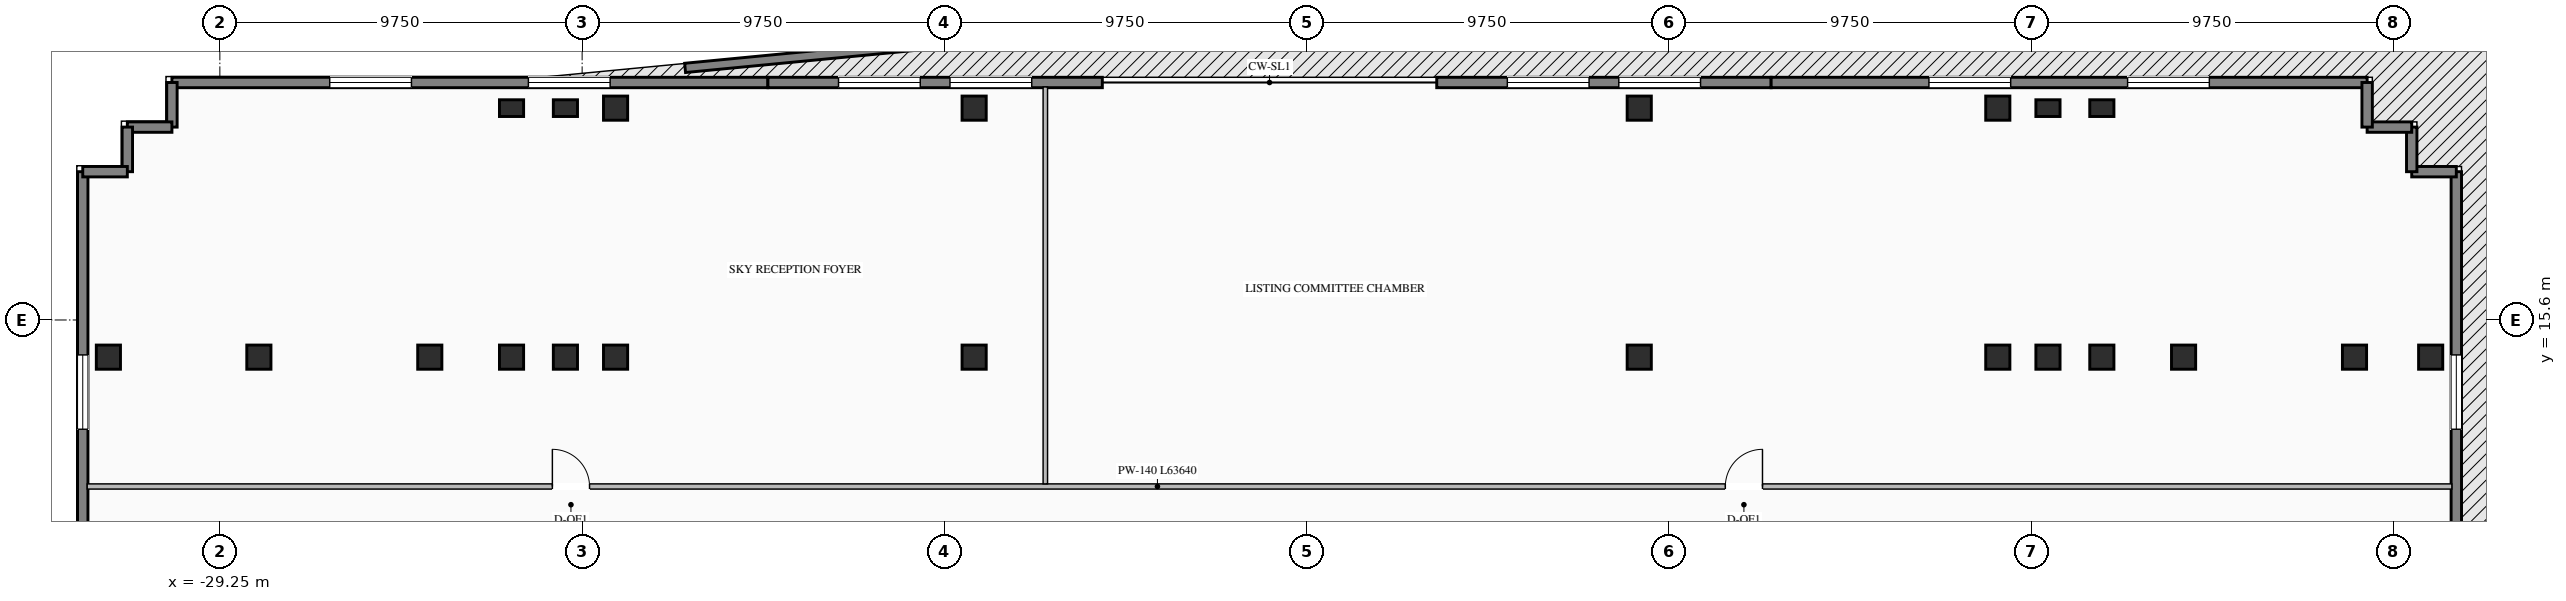
"""IFC4 building model, lengths in metres.
Left out: names, types, materials, properties, quantities, classifications, styles, units other than length and angle.
Written with IfcOpenShell. Run it as: python <this file> out.ifc"""

import sys

from ifc_helpers import new_model, si_unit, direction, frame, frame_2d, origin, origin_2d, place, context, subcontext, project, spatial, rectangle, i_section, extrude, element, fill, save


model = new_model("IFC4")
c1 = context("Model", 3, precision=1e-05, world=origin(), true_north=direction((0.0, 1.0)))
c2 = subcontext(c1, "Body", "Model", "MODEL_VIEW")
j1 = project(units=[si_unit("LENGTHUNIT", "METRE"), si_unit("PLANEANGLEUNIT", "RADIAN")], contexts=[c1])
p1 = place(None, origin())
s1 = spatial("IfcSite", under=j1, at=p1, CompositionType="ELEMENT")
p2 = place(p1, origin())
s2 = spatial("IfcBuilding", under=s1, at=p2, CompositionType="ELEMENT")
p3 = place(p2, frame((0.0, 0.0, 116.65)))
s3 = spatial("IfcBuildingStorey", under=s2, at=p3, CompositionType="ELEMENT", Elevation=116.65)
for number, where, z_axis, x_axis in (
    (1, (-21.4, 14.6, 0.0), (0.0, 0.0, 1.0), (1.0, 0.0, 0.0)),
    (2, (-19.95, 14.6, 0.0), (0.0, 0.0, 1.0), (1.0, 0.0, 0.0)),
    (3, (-18.6, 14.6, 0.0), (0.0, 0.0, 1.0), (1.0, 0.0, 0.0)),
    (4, (-8.95, 14.6, 0.0), (0.0, 0.0, 1.0), (1.0, 0.0, 0.0)),
    (5, (8.95, 14.6, 0.0), (0.0, 0.0, 1.0), (1.0, 0.0, 0.0)),
    (6, (18.6, 14.6, 0.0), (0.0, 0.0, 1.0), (1.0, 0.0, 0.0)),
    (7, (19.95, 14.6, 0.0), (0.0, 0.0, 1.0), (1.0, 0.0, 0.0)),
    (8, (21.4, 14.6, 0.0), (0.0, 0.0, 1.0), (1.0, 0.0, 0.0)),
    (9, (-23.6, 14.6, 0.0), (0.0, 0.0, 1.0), (1.0, 0.0, 0.0)),
    (10, (23.6, 14.6, 0.0), (0.0, 0.0, 1.0), (1.0, 0.0, 0.0)),
    (11, (-28.2, 14.6, 0.0), (0.0, 0.0, 1.0), (1.0, 0.0, 0.0)),
    (12, (28.2, 14.6, 0.0), (0.0, 0.0, 1.0), (1.0, 0.0, 0.0)),
    (13, (-18.6, 21.3, 0.0), (0.0, 0.0, 1.0), (1.0, 0.0, 0.0)),
    (14, (-8.95, 21.3, 0.0), (0.0, 0.0, 1.0), (1.0, 0.0, 0.0)),
):
    element("IfcColumn", number, at=place(p3, frame(where, z_axis=z_axis, x_axis=x_axis)), inside=s3, PredefinedType="COLUMN", context=c2, shape_type="SweptSolid", body=[
        extrude(i_section(OverallWidth=0.65, OverallDepth=0.65, WebThickness=0.028, FlangeThickness=0.04, at=origin_2d()), origin(), (0.0, 0.0, 1.0), 4.2),
    ])
for number, where, z_axis, x_axis in (
    (15, (8.95, 21.3, -0.28), (0.0, 0.0, 1.0), (1.0, 0.0, 0.0)),
    (16, (18.6, 21.3, -0.28), (0.0, 0.0, 1.0), (1.0, 0.0, 0.0)),
    (17, (-32.25, 14.6, -0.28), (0.0, 0.0, 1.0), (1.0, 0.0, 0.0)),
    (18, (30.25, 14.6, -0.28), (0.0, 0.0, 1.0), (1.0, 0.0, 0.0)),
):
    element("IfcColumn", number, at=place(p3, frame(where, z_axis=z_axis, x_axis=x_axis)), inside=s3, PredefinedType="COLUMN", context=c2, shape_type="SweptSolid", body=[
        extrude(i_section(OverallWidth=0.65, OverallDepth=0.65, WebThickness=0.028, FlangeThickness=0.04, at=origin_2d()), origin(), (0.0, 0.0, 1.0), 4.48),
    ])
for number, where, z_axis, x_axis in (
    (19, (-21.4, 21.3, 0.0), (0.0, 0.0, 1.0), (1.0, 0.0, 0.0)),
    (20, (-19.95, 21.3, 0.0), (0.0, 0.0, 1.0), (1.0, 0.0, 0.0)),
):
    element("IfcColumn", number, at=place(p3, frame(where, z_axis=z_axis, x_axis=x_axis)), inside=s3, PredefinedType="PILASTER", context=c2, shape_type="SweptSolid", body=[
        extrude(rectangle(XDim=0.65, YDim=0.45, at=origin_2d()), origin(), (0.0, 0.0, 1.0), 4.2),
    ])
for number, where, z_axis, x_axis in (
    (21, (19.95, 21.3, -0.28), (0.0, 0.0, 1.0), (1.0, 0.0, 0.0)),
    (22, (21.4, 21.3, -0.28), (0.0, 0.0, 1.0), (1.0, 0.0, 0.0)),
):
    element("IfcColumn", number, at=place(p3, frame(where, z_axis=z_axis, x_axis=x_axis)), inside=s3, PredefinedType="PILASTER", context=c2, shape_type="SweptSolid", body=[
        extrude(rectangle(XDim=0.65, YDim=0.45, at=origin_2d()), origin(), (0.0, 0.0, 1.0), 4.48),
    ])
p4 = place(p3, frame((-30.54, 21.99, 0.0), z_axis=(0.0, 0.0, 1.0), x_axis=(1.0, 0.0, 0.0)))
e23 = element("IfcWall", 23, at=p4, inside=s3, PredefinedType="STANDARD", context=c2, shape_type="SweptSolid", body=[
    extrude(rectangle(XDim=16.04, YDim=0.28, at=frame_2d((8.02, 0.0))), origin(), (0.0, 0.0, 1.0), 4.0),
])
p5 = place(p4, frame((4.247, 0.0, 0.76)))
e24 = element("IfcOpeningElement", 24, at=p5, cuts=e23, PredefinedType="OPENING", context=c2, shape_type="SweptSolid", body=[
    extrude(rectangle(XDim=2.2, YDim=2.25, at=frame_2d((1.1, 1.125))), frame((0.0, 0.15, 0.0), z_axis=(0.0, -1.0, 0.0), x_axis=(1.0, 0.0, 0.0)), (0.0, 0.0, 1.0), 0.3),
])
p6 = place(p4, frame((9.593, 0.0, 0.76)))
e25 = element("IfcOpeningElement", 25, at=p6, cuts=e23, PredefinedType="OPENING", context=c2, shape_type="SweptSolid", body=[
    extrude(rectangle(XDim=2.2, YDim=2.25, at=frame_2d((1.1, 1.125))), frame((0.0, 0.15, 0.0), z_axis=(0.0, -1.0, 0.0), x_axis=(1.0, 0.0, 0.0)), (0.0, 0.0, 1.0), 0.3),
])
p7 = place(p3, frame((-14.5, 21.99, 0.0), z_axis=(0.0, 0.0, 1.0), x_axis=(1.0, 0.0, 0.0)))
e26 = element("IfcWall", 26, at=p7, inside=s3, PredefinedType="STANDARD", context=c2, shape_type="SweptSolid", body=[
    extrude(rectangle(XDim=9.0, YDim=0.28, at=frame_2d((4.5, 0.0))), origin(), (0.0, 0.0, 1.0), 4.0),
])
p8 = place(p7, frame((1.9, 0.0, 0.76)))
e27 = element("IfcOpeningElement", 27, at=p8, cuts=e26, PredefinedType="OPENING", context=c2, shape_type="SweptSolid", body=[
    extrude(rectangle(XDim=2.2, YDim=2.25, at=frame_2d((1.1, 1.125))), frame((0.0, 0.15, 0.0), z_axis=(0.0, -1.0, 0.0), x_axis=(1.0, 0.0, 0.0)), (0.0, 0.0, 1.0), 0.3),
])
p9 = place(p7, frame((4.9, 0.0, 0.76)))
e28 = element("IfcOpeningElement", 28, at=p9, cuts=e26, PredefinedType="OPENING", context=c2, shape_type="SweptSolid", body=[
    extrude(rectangle(XDim=2.2, YDim=2.25, at=frame_2d((1.1, 1.125))), frame((0.0, 0.15, 0.0), z_axis=(0.0, -1.0, 0.0), x_axis=(1.0, 0.0, 0.0)), (0.0, 0.0, 1.0), 0.3),
])
p10 = place(p3, frame((3.5, 21.99, 0.0), z_axis=(0.0, 0.0, 1.0), x_axis=(1.0, 0.0, 0.0)))
e29 = element("IfcWall", 29, at=p10, inside=s3, PredefinedType="STANDARD", context=c2, shape_type="SweptSolid", body=[
    extrude(rectangle(XDim=9.0, YDim=0.28, at=frame_2d((4.5, 0.0))), origin(), (0.0, 0.0, 1.0), 4.0),
])
p11 = place(p10, frame((1.9, 0.0, 0.76)))
e30 = element("IfcOpeningElement", 30, at=p11, cuts=e29, PredefinedType="OPENING", context=c2, shape_type="SweptSolid", body=[
    extrude(rectangle(XDim=2.2, YDim=2.25, at=frame_2d((1.1, 1.125))), frame((0.0, 0.15, 0.0), z_axis=(0.0, -1.0, 0.0), x_axis=(1.0, 0.0, 0.0)), (0.0, 0.0, 1.0), 0.3),
])
p12 = place(p10, frame((4.9, 0.0, 0.76)))
e31 = element("IfcOpeningElement", 31, at=p12, cuts=e29, PredefinedType="OPENING", context=c2, shape_type="SweptSolid", body=[
    extrude(rectangle(XDim=2.2, YDim=2.25, at=frame_2d((1.1, 1.125))), frame((0.0, 0.15, 0.0), z_axis=(0.0, -1.0, 0.0), x_axis=(1.0, 0.0, 0.0)), (0.0, 0.0, 1.0), 0.3),
])
p13 = place(p3, frame((12.5, 21.99, 0.0), z_axis=(0.0, 0.0, 1.0), x_axis=(1.0, 0.0, 0.0)))
e32 = element("IfcWall", 32, at=p13, inside=s3, PredefinedType="STANDARD", context=c2, shape_type="SweptSolid", body=[
    extrude(rectangle(XDim=16.04, YDim=0.28, at=frame_2d((8.02, 0.0))), origin(), (0.0, 0.0, 1.0), 4.0),
])
p14 = place(p13, frame((4.247, 0.0, 0.76)))
e33 = element("IfcOpeningElement", 33, at=p14, cuts=e32, PredefinedType="OPENING", context=c2, shape_type="SweptSolid", body=[
    extrude(rectangle(XDim=2.2, YDim=2.25, at=frame_2d((1.1, 1.125))), frame((0.0, 0.15, 0.0), z_axis=(0.0, -1.0, 0.0), x_axis=(1.0, 0.0, 0.0)), (0.0, 0.0, 1.0), 0.3),
])
p15 = place(p13, frame((9.593, 0.0, 0.76)))
e34 = element("IfcOpeningElement", 34, at=p15, cuts=e32, PredefinedType="OPENING", context=c2, shape_type="SweptSolid", body=[
    extrude(rectangle(XDim=2.2, YDim=2.25, at=frame_2d((1.1, 1.125))), frame((0.0, 0.15, 0.0), z_axis=(0.0, -1.0, 0.0), x_axis=(1.0, 0.0, 0.0)), (0.0, 0.0, 1.0), 0.3),
])
p16 = place(p3, frame((-32.94, 1.8, 0.0), z_axis=(0.0, 0.0, 1.0), x_axis=(0.0, 1.0, 0.0)))
e35 = element("IfcWall", 35, at=p16, inside=s3, PredefinedType="STANDARD", context=c2, shape_type="SweptSolid", body=[
    extrude(rectangle(XDim=17.79, YDim=0.28, at=frame_2d((8.895, 0.0))), origin(), (0.0, 0.0, 1.0), 4.0),
])
p17 = place(p16, frame((4.93, 0.0, 0.76)))
e36 = element("IfcOpeningElement", 36, at=p17, cuts=e35, PredefinedType="OPENING", context=c2, shape_type="SweptSolid", body=[
    extrude(rectangle(XDim=2.0, YDim=2.05, at=frame_2d((1.0, 1.025))), frame((0.0, 0.15, 0.0), z_axis=(0.0, -1.0, 0.0), x_axis=(1.0, 0.0, 0.0)), (0.0, 0.0, 1.0), 0.3),
])
p18 = place(p16, frame((10.86, 0.0, 0.76)))
e37 = element("IfcOpeningElement", 37, at=p18, cuts=e35, PredefinedType="OPENING", context=c2, shape_type="SweptSolid", body=[
    extrude(rectangle(XDim=2.0, YDim=2.05, at=frame_2d((1.0, 1.025))), frame((0.0, 0.15, 0.0), z_axis=(0.0, -1.0, 0.0), x_axis=(1.0, 0.0, 0.0)), (0.0, 0.0, 1.0), 0.3),
])
p19 = place(p3, frame((30.94, 19.59, 0.0), z_axis=(0.0, 0.0, 1.0), x_axis=(0.0, -1.0, 0.0)))
e38 = element("IfcWall", 38, at=p19, inside=s3, PredefinedType="STANDARD", context=c2, shape_type="SweptSolid", body=[
    extrude(rectangle(XDim=17.79, YDim=0.28, at=frame_2d((8.895, 0.0))), origin(), (0.0, 0.0, 1.0), 4.0),
])
p20 = place(p19, frame((4.93, 0.0, 0.76)))
e39 = element("IfcOpeningElement", 39, at=p20, cuts=e38, PredefinedType="OPENING", context=c2, shape_type="SweptSolid", body=[
    extrude(rectangle(XDim=2.0, YDim=2.05, at=frame_2d((1.0, 1.025))), frame((0.0, 0.15, 0.0), z_axis=(0.0, -1.0, 0.0), x_axis=(1.0, 0.0, 0.0)), (0.0, 0.0, 1.0), 0.3),
])
p21 = place(p19, frame((10.86, 0.0, 0.76)))
e40 = element("IfcOpeningElement", 40, at=p21, cuts=e38, PredefinedType="OPENING", context=c2, shape_type="SweptSolid", body=[
    extrude(rectangle(XDim=2.0, YDim=2.05, at=frame_2d((1.0, 1.025))), frame((0.0, 0.15, 0.0), z_axis=(0.0, -1.0, 0.0), x_axis=(1.0, 0.0, 0.0)), (0.0, 0.0, 1.0), 0.3),
])
for number, where, z_axis, x_axis in (
    (41, (30.94, 19.59, 0.0), (0.0, 0.0, 1.0), (-1.0, 0.0, 0.0)),
    (42, (29.74, 19.59, 0.0), (0.0, 0.0, 1.0), (0.0, 1.0, 0.0)),
    (43, (29.74, 20.79, 0.0), (0.0, 0.0, 1.0), (-1.0, 0.0, 0.0)),
    (44, (28.54, 20.79, 0.0), (0.0, 0.0, 1.0), (0.0, 1.0, 0.0)),
    (45, (-30.54, 21.99, 0.0), (0.0, 0.0, 1.0), (0.0, -1.0, 0.0)),
    (46, (-30.54, 20.79, 0.0), (0.0, 0.0, 1.0), (-1.0, 0.0, 0.0)),
    (47, (-31.74, 20.79, 0.0), (0.0, 0.0, 1.0), (0.0, -1.0, 0.0)),
    (48, (-31.74, 19.59, 0.0), (0.0, 0.0, 1.0), (-1.0, 0.0, 0.0)),
):
    element("IfcWall", number, at=place(p3, frame(where, z_axis=z_axis, x_axis=x_axis)), inside=s3, PredefinedType="STANDARD", context=c2, shape_type="SweptSolid", body=[
        extrude(rectangle(XDim=1.2, YDim=0.28, at=frame_2d((0.6, 0.0))), origin(), (0.0, 0.0, 1.0), 4.0),
    ])
p22 = place(p3, frame((-16.729, 22.383, 0.0), z_axis=(0.0, 0.0, 1.0), x_axis=(0.995396386066, 0.09584380317, 0.0)))
e49 = element("IfcWall", 49, at=p22, inside=s3, PredefinedType="PARAPET", context=c2, shape_type="SweptSolid", body=[
    extrude(rectangle(XDim=50.026, YDim=0.25, at=frame_2d((25.013, 0.0))), origin(), (0.0, 0.0, 1.0), 1.2),
])
p23 = place(p3, frame((-32.82, 11.12, 0.0), z_axis=(0.0, 0.0, 1.0), x_axis=(1.0, 0.0, 0.0)))
e50 = element("IfcWall", 50, at=p23, inside=s3, PredefinedType="STANDARD", context=c2, shape_type="SweptSolid", body=[
    extrude(rectangle(XDim=63.64, YDim=0.14, at=frame_2d((31.82, 0.0))), origin(), (0.0, 0.0, 1.0), 4.0),
])
p24 = place(p23, frame((12.519, 0.0, 0.0)))
e51 = element("IfcOpeningElement", 51, at=p24, cuts=e50, PredefinedType="OPENING", context=c2, shape_type="SweptSolid", body=[
    extrude(rectangle(XDim=1.0, YDim=2.08, at=frame_2d((0.5, 1.04))), frame((0.0, 0.08, 0.0), z_axis=(0.0, -1.0, 0.0), x_axis=(1.0, 0.0, 0.0)), (0.0, 0.0, 1.0), 0.16),
])
p25 = place(p23, frame((44.087, 0.0, 0.0)))
e52 = element("IfcOpeningElement", 52, at=p25, cuts=e50, PredefinedType="OPENING", context=c2, shape_type="SweptSolid", body=[
    extrude(rectangle(XDim=1.0, YDim=2.08, at=frame_2d((0.5, 1.04))), frame((0.0, 0.08, 0.0), z_axis=(0.0, -1.0, 0.0), x_axis=(1.0, 0.0, 0.0)), (0.0, 0.0, 1.0), 0.16),
])
p26 = place(p3, frame((-7.034, 11.19, 0.0), z_axis=(0.0, 0.0, 1.0), x_axis=(0.0, 1.0, 0.0)))
e53 = element("IfcWall", 53, at=p26, inside=s3, PredefinedType="STANDARD", context=c2, shape_type="SweptSolid", body=[
    extrude(rectangle(XDim=10.68, YDim=0.12, at=frame_2d((5.34, 0.0))), origin(), (0.0, 0.0, 1.0), 4.0),
])
p27 = place(p5, origin())
e54 = element("IfcWindow", 54, at=p27, inside=s3, PartitioningType="DOUBLE_PANEL_VERTICAL", PredefinedType="WINDOW", context=c2, shape_type="SweptSolid", body=[
    extrude(rectangle(XDim=2.2, YDim=2.25, at=frame_2d((1.1, 1.125))), frame((0.0, 0.03, 0.0), z_axis=(0.0, -1.0, 0.0), x_axis=(1.0, 0.0, 0.0)), (0.0, 0.0, 1.0), 0.06),
])
fill(e24, e54)
p28 = place(p6, origin())
e55 = element("IfcWindow", 55, at=p28, inside=s3, PartitioningType="DOUBLE_PANEL_VERTICAL", PredefinedType="WINDOW", context=c2, shape_type="SweptSolid", body=[
    extrude(rectangle(XDim=2.2, YDim=2.25, at=frame_2d((1.1, 1.125))), frame((0.0, 0.03, 0.0), z_axis=(0.0, -1.0, 0.0), x_axis=(1.0, 0.0, 0.0)), (0.0, 0.0, 1.0), 0.06),
])
fill(e25, e55)
p29 = place(p8, origin())
e56 = element("IfcWindow", 56, at=p29, inside=s3, PartitioningType="DOUBLE_PANEL_VERTICAL", PredefinedType="WINDOW", context=c2, shape_type="SweptSolid", body=[
    extrude(rectangle(XDim=2.2, YDim=2.25, at=frame_2d((1.1, 1.125))), frame((0.0, 0.03, 0.0), z_axis=(0.0, -1.0, 0.0), x_axis=(1.0, 0.0, 0.0)), (0.0, 0.0, 1.0), 0.06),
])
fill(e27, e56)
p30 = place(p9, origin())
e57 = element("IfcWindow", 57, at=p30, inside=s3, PartitioningType="DOUBLE_PANEL_VERTICAL", PredefinedType="WINDOW", context=c2, shape_type="SweptSolid", body=[
    extrude(rectangle(XDim=2.2, YDim=2.25, at=frame_2d((1.1, 1.125))), frame((0.0, 0.03, 0.0), z_axis=(0.0, -1.0, 0.0), x_axis=(1.0, 0.0, 0.0)), (0.0, 0.0, 1.0), 0.06),
])
fill(e28, e57)
p31 = place(p11, origin())
e58 = element("IfcWindow", 58, at=p31, inside=s3, PartitioningType="DOUBLE_PANEL_VERTICAL", PredefinedType="WINDOW", context=c2, shape_type="SweptSolid", body=[
    extrude(rectangle(XDim=2.2, YDim=2.25, at=frame_2d((1.1, 1.125))), frame((0.0, 0.03, 0.0), z_axis=(0.0, -1.0, 0.0), x_axis=(1.0, 0.0, 0.0)), (0.0, 0.0, 1.0), 0.06),
])
fill(e30, e58)
p32 = place(p12, origin())
e59 = element("IfcWindow", 59, at=p32, inside=s3, PartitioningType="DOUBLE_PANEL_VERTICAL", PredefinedType="WINDOW", context=c2, shape_type="SweptSolid", body=[
    extrude(rectangle(XDim=2.2, YDim=2.25, at=frame_2d((1.1, 1.125))), frame((0.0, 0.03, 0.0), z_axis=(0.0, -1.0, 0.0), x_axis=(1.0, 0.0, 0.0)), (0.0, 0.0, 1.0), 0.06),
])
fill(e31, e59)
p33 = place(p14, origin())
e60 = element("IfcWindow", 60, at=p33, inside=s3, PartitioningType="DOUBLE_PANEL_VERTICAL", PredefinedType="WINDOW", context=c2, shape_type="SweptSolid", body=[
    extrude(rectangle(XDim=2.2, YDim=2.25, at=frame_2d((1.1, 1.125))), frame((0.0, 0.03, 0.0), z_axis=(0.0, -1.0, 0.0), x_axis=(1.0, 0.0, 0.0)), (0.0, 0.0, 1.0), 0.06),
])
fill(e33, e60)
p34 = place(p15, origin())
e61 = element("IfcWindow", 61, at=p34, inside=s3, PartitioningType="DOUBLE_PANEL_VERTICAL", PredefinedType="WINDOW", context=c2, shape_type="SweptSolid", body=[
    extrude(rectangle(XDim=2.2, YDim=2.25, at=frame_2d((1.1, 1.125))), frame((0.0, 0.03, 0.0), z_axis=(0.0, -1.0, 0.0), x_axis=(1.0, 0.0, 0.0)), (0.0, 0.0, 1.0), 0.06),
])
fill(e34, e61)
p35 = place(p18, origin())
e62 = element("IfcWindow", 62, at=p35, inside=s3, PartitioningType="DOUBLE_PANEL_VERTICAL", PredefinedType="WINDOW", context=c2, shape_type="SweptSolid", body=[
    extrude(rectangle(XDim=2.0, YDim=2.05, at=frame_2d((1.0, 1.025))), frame((0.0, 0.03, 0.0), z_axis=(0.0, -1.0, 0.0), x_axis=(1.0, 0.0, 0.0)), (0.0, 0.0, 1.0), 0.06),
])
fill(e37, e62)
p36 = place(p20, origin())
e63 = element("IfcWindow", 63, at=p36, inside=s3, PartitioningType="DOUBLE_PANEL_VERTICAL", PredefinedType="WINDOW", context=c2, shape_type="SweptSolid", body=[
    extrude(rectangle(XDim=2.0, YDim=2.05, at=frame_2d((1.0, 1.025))), frame((0.0, 0.03, 0.0), z_axis=(0.0, -1.0, 0.0), x_axis=(1.0, 0.0, 0.0)), (0.0, 0.0, 1.0), 0.06),
])
fill(e39, e63)
p37 = place(p24, origin())
e64 = element("IfcDoor", 64, at=p37, inside=s3, OperationType="SINGLE_SWING_LEFT", PredefinedType="DOOR", context=c2, shape_type="SweptSolid", body=[
    extrude(rectangle(XDim=1.0, YDim=2.08, at=frame_2d((0.5, 1.04))), frame((0.0, 0.025, 0.0), z_axis=(0.0, -1.0, 0.0), x_axis=(1.0, 0.0, 0.0)), (0.0, 0.0, 1.0), 0.05),
])
fill(e51, e64)
p38 = place(p25, origin())
e65 = element("IfcDoor", 65, at=p38, inside=s3, OperationType="SINGLE_SWING_RIGHT", PredefinedType="DOOR", context=c2, shape_type="SweptSolid", body=[
    extrude(rectangle(XDim=1.0, YDim=2.08, at=frame_2d((0.5, 1.04))), frame((0.0, 0.025, 0.0), z_axis=(0.0, -1.0, 0.0), x_axis=(1.0, 0.0, 0.0)), (0.0, 0.0, 1.0), 0.05),
])
fill(e52, e65)
save(model, sys.argv[1])
